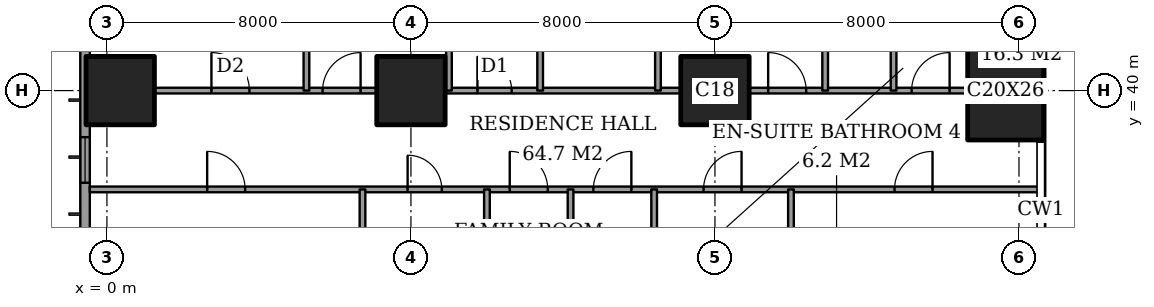
"""IFC4 building model, lengths in metres.
Left out: names, types, materials, properties, quantities, classifications, styles, units other than length and angle.
Written with IfcOpenShell. Run it as: python <this file> out.ifc"""

import sys

from ifc_helpers import new_model, si_unit, direction, frame, frame_2d, origin, origin_2d, place, context, subcontext, project, spatial, rectangle, extrude, element, fill, save


model = new_model("IFC4")
c1 = context("Model", 3, precision=1e-05, world=origin(), true_north=direction((0.0, 1.0)))
c2 = subcontext(c1, "Body", "Model", "MODEL_VIEW")
j1 = project(units=[si_unit("LENGTHUNIT", "METRE"), si_unit("PLANEANGLEUNIT", "RADIAN")], contexts=[c1])
p1 = place(None, origin())
s1 = spatial("IfcSite", under=j1, at=p1, CompositionType="ELEMENT")
p2 = place(p1, origin())
s2 = spatial("IfcBuilding", under=s1, at=p2, CompositionType="ELEMENT")
p3 = place(p2, frame((0.0, 0.0, 189.4)))
s3 = spatial("IfcBuildingStorey", under=s2, at=p3, CompositionType="ELEMENT", Elevation=189.4)
for number, where, z_axis, x_axis in (
    (1, (0.35, 40.0, 0.0), (0.0, 0.0, 1.0), (1.0, 0.0, 0.0)),
    (2, (8.0, 40.0, 0.0), (0.0, 0.0, 1.0), (1.0, 0.0, 0.0)),
    (3, (16.0, 40.0, 0.0), (0.0, 0.0, 1.0), (1.0, 0.0, 0.0)),
):
    element("IfcColumn", number, at=place(p3, frame(where, z_axis=z_axis, x_axis=x_axis)), inside=s3, PredefinedType="COLUMN", context=c2, shape_type="SweptSolid", body=[
        extrude(rectangle(XDim=1.8, YDim=1.8, at=origin_2d()), origin(), (0.0, 0.0, 1.0), 3.6),
    ])
p4 = place(p3, frame((23.65, 40.0, 0.0), z_axis=(0.0, 0.0, 1.0), x_axis=(1.0, 0.0, 0.0)))
e4 = element("IfcColumn", 4, at=p4, inside=s3, PredefinedType="COLUMN", context=c2, shape_type="SweptSolid", body=[
    extrude(rectangle(XDim=2.0, YDim=2.6, at=origin_2d()), origin(), (0.0, 0.0, 1.0), 3.6),
])
p5 = place(p3, frame((-0.575, 44.825, 0.0), z_axis=(0.0, 0.0, 1.0), x_axis=(0.0, -1.0, 0.0)))
e5 = element("IfcWall", 5, at=p5, inside=s3, PredefinedType="SOLIDWALL", context=c2, shape_type="SweptSolid", body=[
    extrude(rectangle(XDim=41.65, YDim=0.25, at=frame_2d((20.825, 0.0))), origin(), (0.0, 0.0, 1.0), 3.6),
])
p6 = place(p5, frame((0.825, 0.0, 0.2)))
e6 = element("IfcOpeningElement", 6, at=p6, cuts=e5, PredefinedType="OPENING", context=c2, shape_type="SweptSolid", body=[
    extrude(rectangle(XDim=2.4, YDim=2.4, at=frame_2d((1.2, 1.2))), frame((0.0, 0.135, 0.0), z_axis=(0.0, -1.0, 0.0), x_axis=(1.0, 0.0, 0.0)), (0.0, 0.0, 1.0), 0.27),
])
p7 = place(p5, frame((6.05, 0.0, 0.2)))
e7 = element("IfcOpeningElement", 7, at=p7, cuts=e5, PredefinedType="OPENING", context=c2, shape_type="SweptSolid", body=[
    extrude(rectangle(XDim=1.2, YDim=2.4, at=frame_2d((0.6, 1.2))), frame((0.0, 0.135, 0.0), z_axis=(0.0, -1.0, 0.0), x_axis=(1.0, 0.0, 0.0)), (0.0, 0.0, 1.0), 0.27),
])
p8 = place(p5, frame((8.475, 0.0, 0.2)))
e8 = element("IfcOpeningElement", 8, at=p8, cuts=e5, PredefinedType="OPENING", context=c2, shape_type="SweptSolid", body=[
    extrude(rectangle(XDim=2.4, YDim=2.4, at=frame_2d((1.2, 1.2))), frame((0.0, 0.135, 0.0), z_axis=(0.0, -1.0, 0.0), x_axis=(1.0, 0.0, 0.0)), (0.0, 0.0, 1.0), 0.27),
])
p9 = place(p5, frame((15.625, 0.0, 0.2)))
e9 = element("IfcOpeningElement", 9, at=p9, cuts=e5, PredefinedType="OPENING", context=c2, shape_type="SweptSolid", body=[
    extrude(rectangle(XDim=2.4, YDim=2.4, at=frame_2d((1.2, 1.2))), frame((0.0, 0.135, 0.0), z_axis=(0.0, -1.0, 0.0), x_axis=(1.0, 0.0, 0.0)), (0.0, 0.0, 1.0), 0.27),
])
p10 = place(p5, frame((23.625, 0.0, 0.2)))
e10 = element("IfcOpeningElement", 10, at=p10, cuts=e5, PredefinedType="OPENING", context=c2, shape_type="SweptSolid", body=[
    extrude(rectangle(XDim=2.4, YDim=2.4, at=frame_2d((1.2, 1.2))), frame((0.0, 0.135, 0.0), z_axis=(0.0, -1.0, 0.0), x_axis=(1.0, 0.0, 0.0)), (0.0, 0.0, 1.0), 0.27),
])
p11 = place(p5, frame((30.775, 0.0, 0.2)))
e11 = element("IfcOpeningElement", 11, at=p11, cuts=e5, PredefinedType="OPENING", context=c2, shape_type="SweptSolid", body=[
    extrude(rectangle(XDim=2.4, YDim=2.4, at=frame_2d((1.2, 1.2))), frame((0.0, 0.135, 0.0), z_axis=(0.0, -1.0, 0.0), x_axis=(1.0, 0.0, 0.0)), (0.0, 0.0, 1.0), 0.27),
])
p12 = place(p5, frame((34.55, 0.0, 0.2)))
e12 = element("IfcOpeningElement", 12, at=p12, cuts=e5, PredefinedType="OPENING", context=c2, shape_type="SweptSolid", body=[
    extrude(rectangle(XDim=1.2, YDim=2.4, at=frame_2d((0.6, 1.2))), frame((0.0, 0.135, 0.0), z_axis=(0.0, -1.0, 0.0), x_axis=(1.0, 0.0, 0.0)), (0.0, 0.0, 1.0), 0.27),
])
p13 = place(p5, frame((38.425, 0.0, 0.2)))
e13 = element("IfcOpeningElement", 13, at=p13, cuts=e5, PredefinedType="OPENING", context=c2, shape_type="SweptSolid", body=[
    extrude(rectangle(XDim=2.4, YDim=2.4, at=frame_2d((1.2, 1.2))), frame((0.0, 0.135, 0.0), z_axis=(0.0, -1.0, 0.0), x_axis=(1.0, 0.0, 0.0)), (0.0, 0.0, 1.0), 0.27),
])
p14 = place(p3, frame((-0.45, 37.4, 0.0), z_axis=(0.0, 0.0, 1.0), x_axis=(1.0, 0.0, 0.0)))
e14 = element("IfcWall", 14, at=p14, inside=s3, PredefinedType="PARTITIONING", context=c2, shape_type="SweptSolid", body=[
    extrude(rectangle(XDim=25.011, YDim=0.15, at=frame_2d((12.505, 0.0))), origin(), (0.0, 0.0, 1.0), 3.35),
])
p15 = place(p14, frame((13.25, 0.0, 0.0)))
e15 = element("IfcOpeningElement", 15, at=p15, cuts=e14, PredefinedType="OPENING", context=c2, shape_type="SweptSolid", body=[
    extrude(rectangle(XDim=1.0, YDim=2.1, at=frame_2d((0.5, 1.05))), frame((0.0, 0.085, 0.0), z_axis=(0.0, -1.0, 0.0), x_axis=(1.0, 0.0, 0.0)), (0.0, 0.0, 1.0), 0.17),
])
p16 = place(p14, frame((3.087, 0.0, 0.0)))
e16 = element("IfcOpeningElement", 16, at=p16, cuts=e14, PredefinedType="OPENING", context=c2, shape_type="SweptSolid", body=[
    extrude(rectangle(XDim=1.0, YDim=2.1, at=frame_2d((0.5, 1.05))), frame((0.0, 0.085, 0.0), z_axis=(0.0, -1.0, 0.0), x_axis=(1.0, 0.0, 0.0)), (0.0, 0.0, 1.0), 0.17),
])
p17 = place(p14, frame((8.363, 0.0, 0.0)))
e17 = element("IfcOpeningElement", 17, at=p17, cuts=e14, PredefinedType="OPENING", context=c2, shape_type="SweptSolid", body=[
    extrude(rectangle(XDim=0.9, YDim=2.1, at=frame_2d((0.45, 1.05))), frame((0.0, 0.085, 0.0), z_axis=(0.0, -1.0, 0.0), x_axis=(1.0, 0.0, 0.0)), (0.0, 0.0, 1.0), 0.17),
])
p18 = place(p14, frame((11.05, 0.0, 0.0)))
e18 = element("IfcOpeningElement", 18, at=p18, cuts=e14, PredefinedType="OPENING", context=c2, shape_type="SweptSolid", body=[
    extrude(rectangle(XDim=1.0, YDim=2.1, at=frame_2d((0.5, 1.05))), frame((0.0, 0.085, 0.0), z_axis=(0.0, -1.0, 0.0), x_axis=(1.0, 0.0, 0.0)), (0.0, 0.0, 1.0), 0.17),
])
p19 = place(p14, frame((16.15, 0.0, 0.0)))
e19 = element("IfcOpeningElement", 19, at=p19, cuts=e14, PredefinedType="OPENING", context=c2, shape_type="SweptSolid", body=[
    extrude(rectangle(XDim=1.0, YDim=2.1, at=frame_2d((0.5, 1.05))), frame((0.0, 0.085, 0.0), z_axis=(0.0, -1.0, 0.0), x_axis=(1.0, 0.0, 0.0)), (0.0, 0.0, 1.0), 0.17),
])
p20 = place(p14, frame((21.175, 0.0, 0.0)))
e20 = element("IfcOpeningElement", 20, at=p20, cuts=e14, PredefinedType="OPENING", context=c2, shape_type="SweptSolid", body=[
    extrude(rectangle(XDim=1.0, YDim=2.1, at=frame_2d((0.5, 1.05))), frame((0.0, 0.085, 0.0), z_axis=(0.0, -1.0, 0.0), x_axis=(1.0, 0.0, 0.0)), (0.0, 0.0, 1.0), 0.17),
])
p21 = place(p3, frame((1.25, 40.0, 0.0), z_axis=(0.0, 0.0, 1.0), x_axis=(1.0, 0.0, 0.0)))
e21 = element("IfcWall", 21, at=p21, inside=s3, PredefinedType="PARTITIONING", context=c2, shape_type="SweptSolid", body=[
    extrude(rectangle(XDim=5.85, YDim=0.15, at=frame_2d((2.925, 0.0))), origin(), (0.0, 0.0, 1.0), 3.35),
])
p22 = place(p21, frame((1.5, 0.0, 0.0)))
e22 = element("IfcOpeningElement", 22, at=p22, cuts=e21, PredefinedType="OPENING", context=c2, shape_type="SweptSolid", body=[
    extrude(rectangle(XDim=1.0, YDim=2.1, at=frame_2d((0.5, 1.05))), frame((0.0, 0.085, 0.0), z_axis=(0.0, -1.0, 0.0), x_axis=(1.0, 0.0, 0.0)), (0.0, 0.0, 1.0), 0.17),
])
p23 = place(p21, frame((4.425, 0.0, 0.0)))
e23 = element("IfcOpeningElement", 23, at=p23, cuts=e21, PredefinedType="OPENING", context=c2, shape_type="SweptSolid", body=[
    extrude(rectangle(XDim=1.0, YDim=2.1, at=frame_2d((0.5, 1.05))), frame((0.0, 0.085, 0.0), z_axis=(0.0, -1.0, 0.0), x_axis=(1.0, 0.0, 0.0)), (0.0, 0.0, 1.0), 0.17),
])
p24 = place(p3, frame((8.9, 40.0, 0.0), z_axis=(0.0, 0.0, 1.0), x_axis=(1.0, 0.0, 0.0)))
e24 = element("IfcWall", 24, at=p24, inside=s3, PredefinedType="PARTITIONING", context=c2, shape_type="SweptSolid", body=[
    extrude(rectangle(XDim=6.2, YDim=0.15, at=frame_2d((3.1, 0.0))), origin(), (0.0, 0.0, 1.0), 3.35),
])
p25 = place(p24, frame((0.85, 0.0, 0.0)))
e25 = element("IfcOpeningElement", 25, at=p25, cuts=e24, PredefinedType="OPENING", context=c2, shape_type="SweptSolid", body=[
    extrude(rectangle(XDim=0.9, YDim=2.1, at=frame_2d((0.45, 1.05))), frame((0.0, 0.085, 0.0), z_axis=(0.0, -1.0, 0.0), x_axis=(1.0, 0.0, 0.0)), (0.0, 0.0, 1.0), 0.17),
])
p26 = place(p3, frame((16.9, 40.0, 0.0), z_axis=(0.0, 0.0, 1.0), x_axis=(1.0, 0.0, 0.0)))
e26 = element("IfcWall", 26, at=p26, inside=s3, PredefinedType="PARTITIONING", context=c2, shape_type="SweptSolid", body=[
    extrude(rectangle(XDim=5.75, YDim=0.15, at=frame_2d((2.875, 0.0))), origin(), (0.0, 0.0, 1.0), 3.35),
])
p27 = place(p26, frame((0.5, 0.0, 0.0)))
e27 = element("IfcOpeningElement", 27, at=p27, cuts=e26, PredefinedType="OPENING", context=c2, shape_type="SweptSolid", body=[
    extrude(rectangle(XDim=1.0, YDim=2.1, at=frame_2d((0.5, 1.05))), frame((0.0, 0.085, 0.0), z_axis=(0.0, -1.0, 0.0), x_axis=(1.0, 0.0, 0.0)), (0.0, 0.0, 1.0), 0.17),
])
p28 = place(p26, frame((4.275, 0.0, 0.0)))
e28 = element("IfcOpeningElement", 28, at=p28, cuts=e26, PredefinedType="OPENING", context=c2, shape_type="SweptSolid", body=[
    extrude(rectangle(XDim=1.0, YDim=2.1, at=frame_2d((0.5, 1.05))), frame((0.0, 0.085, 0.0), z_axis=(0.0, -1.0, 0.0), x_axis=(1.0, 0.0, 0.0)), (0.0, 0.0, 1.0), 0.17),
])
p29 = place(p3, frame((5.25, 40.0, 0.0), z_axis=(0.0, 0.0, 1.0), x_axis=(0.0, 1.0, 0.0)))
e29 = element("IfcWall", 29, at=p29, inside=s3, PredefinedType="PARTITIONING", context=c2, shape_type="SweptSolid", body=[
    extrude(rectangle(XDim=8.45, YDim=0.15, at=frame_2d((4.225, 0.0))), origin(), (0.0, 0.0, 1.0), 3.35),
])
p30 = place(p3, frame((6.725, 33.2, 0.0), z_axis=(0.0, 0.0, 1.0), x_axis=(0.0, 1.0, 0.0)))
e30 = element("IfcWall", 30, at=p30, inside=s3, PredefinedType="PARTITIONING", context=c2, shape_type="SweptSolid", body=[
    extrude(rectangle(XDim=4.2, YDim=0.15, at=frame_2d((2.1, 0.0))), origin(), (0.0, 0.0, 1.0), 3.35),
])
p31 = place(p3, frame((9.0, 40.0, 0.0), z_axis=(0.0, 0.0, 1.0), x_axis=(0.0, 1.0, 0.0)))
e31 = element("IfcWall", 31, at=p31, inside=s3, PredefinedType="PARTITIONING", context=c2, shape_type="SweptSolid", body=[
    extrude(rectangle(XDim=8.45, YDim=0.15, at=frame_2d((4.225, 0.0))), origin(), (0.0, 0.0, 1.0), 3.35),
])
p32 = place(p3, frame((10.0, 28.0, 0.0), z_axis=(0.0, 0.0, 1.0), x_axis=(0.0, 1.0, 0.0)))
e32 = element("IfcWall", 32, at=p32, inside=s3, PredefinedType="PARTITIONING", context=c2, shape_type="SweptSolid", body=[
    extrude(rectangle(XDim=9.4, YDim=0.15, at=frame_2d((4.7, 0.0))), origin(), (0.0, 0.0, 1.0), 3.35),
])
p33 = place(p32, frame((0.5, 0.0, 0.0)))
e33 = element("IfcOpeningElement", 33, at=p33, cuts=e32, PredefinedType="OPENING", context=c2, shape_type="SweptSolid", body=[
    extrude(rectangle(XDim=1.0, YDim=2.1, at=frame_2d((0.5, 1.05))), frame((0.0, 0.085, 0.0), z_axis=(0.0, -1.0, 0.0), x_axis=(1.0, 0.0, 0.0)), (0.0, 0.0, 1.0), 0.17),
])
p34 = place(p3, frame((11.4, 40.0, 0.0), z_axis=(0.0, 0.0, 1.0), x_axis=(0.0, 1.0, 0.0)))
e34 = element("IfcWall", 34, at=p34, inside=s3, PredefinedType="PARTITIONING", context=c2, shape_type="SweptSolid", body=[
    extrude(rectangle(XDim=8.45, YDim=0.15, at=frame_2d((4.225, 0.0))), origin(), (0.0, 0.0, 1.0), 3.35),
])
for number, where, z_axis, x_axis in (
    (35, (12.2, 30.0, 0.0), (0.0, 0.0, 1.0), (0.0, 1.0, 0.0)),
    (36, (14.4, 30.0, 0.0), (0.0, 0.0, 1.0), (0.0, 1.0, 0.0)),
):
    element("IfcWall", number, at=place(p3, frame(where, z_axis=z_axis, x_axis=x_axis)), inside=s3, PredefinedType="PARTITIONING", context=c2, shape_type="SweptSolid", body=[
        extrude(rectangle(XDim=7.4, YDim=0.15, at=frame_2d((3.7, 0.0))), origin(), (0.0, 0.0, 1.0), 3.35),
    ])
p35 = place(p3, frame((14.5, 40.0, 0.0), z_axis=(0.0, 0.0, 1.0), x_axis=(0.0, 1.0, 0.0)))
e37 = element("IfcWall", 37, at=p35, inside=s3, PredefinedType="PARTITIONING", context=c2, shape_type="SweptSolid", body=[
    extrude(rectangle(XDim=8.45, YDim=0.15, at=frame_2d((4.225, 0.0))), origin(), (0.0, 0.0, 1.0), 3.35),
])
p36 = place(p35, frame((3.775, 0.0, 0.0)))
e38 = element("IfcOpeningElement", 38, at=p36, cuts=e37, PredefinedType="OPENING", context=c2, shape_type="SweptSolid", body=[
    extrude(rectangle(XDim=0.9, YDim=2.1, at=frame_2d((0.45, 1.05))), frame((0.0, 0.085, 0.0), z_axis=(0.0, -1.0, 0.0), x_axis=(1.0, 0.0, 0.0)), (0.0, 0.0, 1.0), 0.17),
])
p37 = place(p3, frame((18.0, 28.0, 0.0), z_axis=(0.0, 0.0, 1.0), x_axis=(0.0, 1.0, 0.0)))
e39 = element("IfcWall", 39, at=p37, inside=s3, PredefinedType="PARTITIONING", context=c2, shape_type="SweptSolid", body=[
    extrude(rectangle(XDim=9.4, YDim=0.15, at=frame_2d((4.7, 0.0))), origin(), (0.0, 0.0, 1.0), 3.35),
])
p38 = place(p37, frame((0.55, 0.0, 0.0)))
e40 = element("IfcOpeningElement", 40, at=p38, cuts=e39, PredefinedType="OPENING", context=c2, shape_type="SweptSolid", body=[
    extrude(rectangle(XDim=0.9, YDim=2.1, at=frame_2d((0.45, 1.05))), frame((0.0, 0.085, 0.0), z_axis=(0.0, -1.0, 0.0), x_axis=(1.0, 0.0, 0.0)), (0.0, 0.0, 1.0), 0.17),
])
p39 = place(p3, frame((18.9, 40.0, 0.0), z_axis=(0.0, 0.0, 1.0), x_axis=(0.0, 1.0, 0.0)))
e41 = element("IfcWall", 41, at=p39, inside=s3, PredefinedType="PARTITIONING", context=c2, shape_type="SweptSolid", body=[
    extrude(rectangle(XDim=8.45, YDim=0.15, at=frame_2d((4.225, 0.0))), origin(), (0.0, 0.0, 1.0), 3.35),
])
p40 = place(p3, frame((20.7, 40.0, 0.0), z_axis=(0.0, 0.0, 1.0), x_axis=(0.0, 1.0, 0.0)))
e42 = element("IfcWall", 42, at=p40, inside=s3, PredefinedType="PARTITIONING", context=c2, shape_type="SweptSolid", body=[
    extrude(rectangle(XDim=8.45, YDim=0.15, at=frame_2d((4.225, 0.0))), origin(), (0.0, 0.0, 1.0), 3.35),
])
p41 = place(p40, frame((3.775, 0.0, 0.0)))
e43 = element("IfcOpeningElement", 43, at=p41, cuts=e42, PredefinedType="OPENING", context=c2, shape_type="SweptSolid", body=[
    extrude(rectangle(XDim=0.9, YDim=2.1, at=frame_2d((0.45, 1.05))), frame((0.0, 0.085, 0.0), z_axis=(0.0, -1.0, 0.0), x_axis=(1.0, 0.0, 0.0)), (0.0, 0.0, 1.0), 0.17),
])
p42 = place(p7, origin())
e44 = element("IfcWindow", 44, at=p42, inside=s3, PartitioningType="SINGLE_PANEL", PredefinedType="WINDOW", context=c2, shape_type="SweptSolid", body=[
    extrude(rectangle(XDim=1.2, YDim=2.4, at=frame_2d((0.6, 1.2))), frame((0.0, 0.03, 0.0), z_axis=(0.0, -1.0, 0.0), x_axis=(1.0, 0.0, 0.0)), (0.0, 0.0, 1.0), 0.06),
])
fill(e7, e44)
p43 = place(p22, origin())
e45 = element("IfcDoor", 45, at=p43, inside=s3, OperationType="SINGLE_SWING_RIGHT", PredefinedType="DOOR", context=c2, shape_type="SweptSolid", body=[
    extrude(rectangle(XDim=1.0, YDim=2.1, at=frame_2d((0.5, 1.05))), frame((0.0, 0.025, 0.0), z_axis=(0.0, -1.0, 0.0), x_axis=(1.0, 0.0, 0.0)), (0.0, 0.0, 1.0), 0.05),
])
fill(e22, e45)
p44 = place(p23, origin())
e46 = element("IfcDoor", 46, at=p44, inside=s3, OperationType="SINGLE_SWING_LEFT", PredefinedType="DOOR", context=c2, shape_type="SweptSolid", body=[
    extrude(rectangle(XDim=1.0, YDim=2.1, at=frame_2d((0.5, 1.05))), frame((0.0, 0.025, 0.0), z_axis=(0.0, -1.0, 0.0), x_axis=(1.0, 0.0, 0.0)), (0.0, 0.0, 1.0), 0.05),
])
fill(e23, e46)
p45 = place(p25, origin())
e47 = element("IfcDoor", 47, at=p45, inside=s3, OperationType="SINGLE_SWING_RIGHT", PredefinedType="DOOR", context=c2, shape_type="SweptSolid", body=[
    extrude(rectangle(XDim=0.9, YDim=2.1, at=frame_2d((0.45, 1.05))), frame((0.0, 0.025, 0.0), z_axis=(0.0, -1.0, 0.0), x_axis=(1.0, 0.0, 0.0)), (0.0, 0.0, 1.0), 0.05),
])
fill(e25, e47)
p46 = place(p27, origin())
e48 = element("IfcDoor", 48, at=p46, inside=s3, OperationType="SINGLE_SWING_RIGHT", PredefinedType="DOOR", context=c2, shape_type="SweptSolid", body=[
    extrude(rectangle(XDim=1.0, YDim=2.1, at=frame_2d((0.5, 1.05))), frame((0.0, 0.025, 0.0), z_axis=(0.0, -1.0, 0.0), x_axis=(1.0, 0.0, 0.0)), (0.0, 0.0, 1.0), 0.05),
])
fill(e27, e48)
p47 = place(p28, origin())
e49 = element("IfcDoor", 49, at=p47, inside=s3, OperationType="SINGLE_SWING_LEFT", PredefinedType="DOOR", context=c2, shape_type="SweptSolid", body=[
    extrude(rectangle(XDim=1.0, YDim=2.1, at=frame_2d((0.5, 1.05))), frame((0.0, 0.025, 0.0), z_axis=(0.0, -1.0, 0.0), x_axis=(1.0, 0.0, 0.0)), (0.0, 0.0, 1.0), 0.05),
])
fill(e28, e49)
p48 = place(p15, origin())
e50 = element("IfcDoor", 50, at=p48, inside=s3, OperationType="SINGLE_SWING_LEFT", PredefinedType="DOOR", context=c2, shape_type="SweptSolid", body=[
    extrude(rectangle(XDim=1.0, YDim=2.1, at=frame_2d((0.5, 1.05))), frame((0.0, 0.025, 0.0), z_axis=(0.0, -1.0, 0.0), x_axis=(1.0, 0.0, 0.0)), (0.0, 0.0, 1.0), 0.05),
])
fill(e15, e50)
p49 = place(p16, origin())
e51 = element("IfcDoor", 51, at=p49, inside=s3, OperationType="SINGLE_SWING_RIGHT", PredefinedType="DOOR", context=c2, shape_type="SweptSolid", body=[
    extrude(rectangle(XDim=1.0, YDim=2.1, at=frame_2d((0.5, 1.05))), frame((0.0, 0.025, 0.0), z_axis=(0.0, -1.0, 0.0), x_axis=(1.0, 0.0, 0.0)), (0.0, 0.0, 1.0), 0.05),
])
fill(e16, e51)
p50 = place(p17, origin())
e52 = element("IfcDoor", 52, at=p50, inside=s3, OperationType="SINGLE_SWING_RIGHT", PredefinedType="DOOR", context=c2, shape_type="SweptSolid", body=[
    extrude(rectangle(XDim=0.9, YDim=2.1, at=frame_2d((0.45, 1.05))), frame((0.0, 0.025, 0.0), z_axis=(0.0, -1.0, 0.0), x_axis=(1.0, 0.0, 0.0)), (0.0, 0.0, 1.0), 0.05),
])
fill(e17, e52)
p51 = place(p18, origin())
e53 = element("IfcDoor", 53, at=p51, inside=s3, OperationType="SINGLE_SWING_RIGHT", PredefinedType="DOOR", context=c2, shape_type="SweptSolid", body=[
    extrude(rectangle(XDim=1.0, YDim=2.1, at=frame_2d((0.5, 1.05))), frame((0.0, 0.025, 0.0), z_axis=(0.0, -1.0, 0.0), x_axis=(1.0, 0.0, 0.0)), (0.0, 0.0, 1.0), 0.05),
])
fill(e18, e53)
p52 = place(p19, origin())
e54 = element("IfcDoor", 54, at=p52, inside=s3, OperationType="SINGLE_SWING_LEFT", PredefinedType="DOOR", context=c2, shape_type="SweptSolid", body=[
    extrude(rectangle(XDim=1.0, YDim=2.1, at=frame_2d((0.5, 1.05))), frame((0.0, 0.025, 0.0), z_axis=(0.0, -1.0, 0.0), x_axis=(1.0, 0.0, 0.0)), (0.0, 0.0, 1.0), 0.05),
])
fill(e19, e54)
p53 = place(p20, origin())
e55 = element("IfcDoor", 55, at=p53, inside=s3, OperationType="SINGLE_SWING_LEFT", PredefinedType="DOOR", context=c2, shape_type="SweptSolid", body=[
    extrude(rectangle(XDim=1.0, YDim=2.1, at=frame_2d((0.5, 1.05))), frame((0.0, 0.025, 0.0), z_axis=(0.0, -1.0, 0.0), x_axis=(1.0, 0.0, 0.0)), (0.0, 0.0, 1.0), 0.05),
])
fill(e20, e55)
save(model, sys.argv[1])
